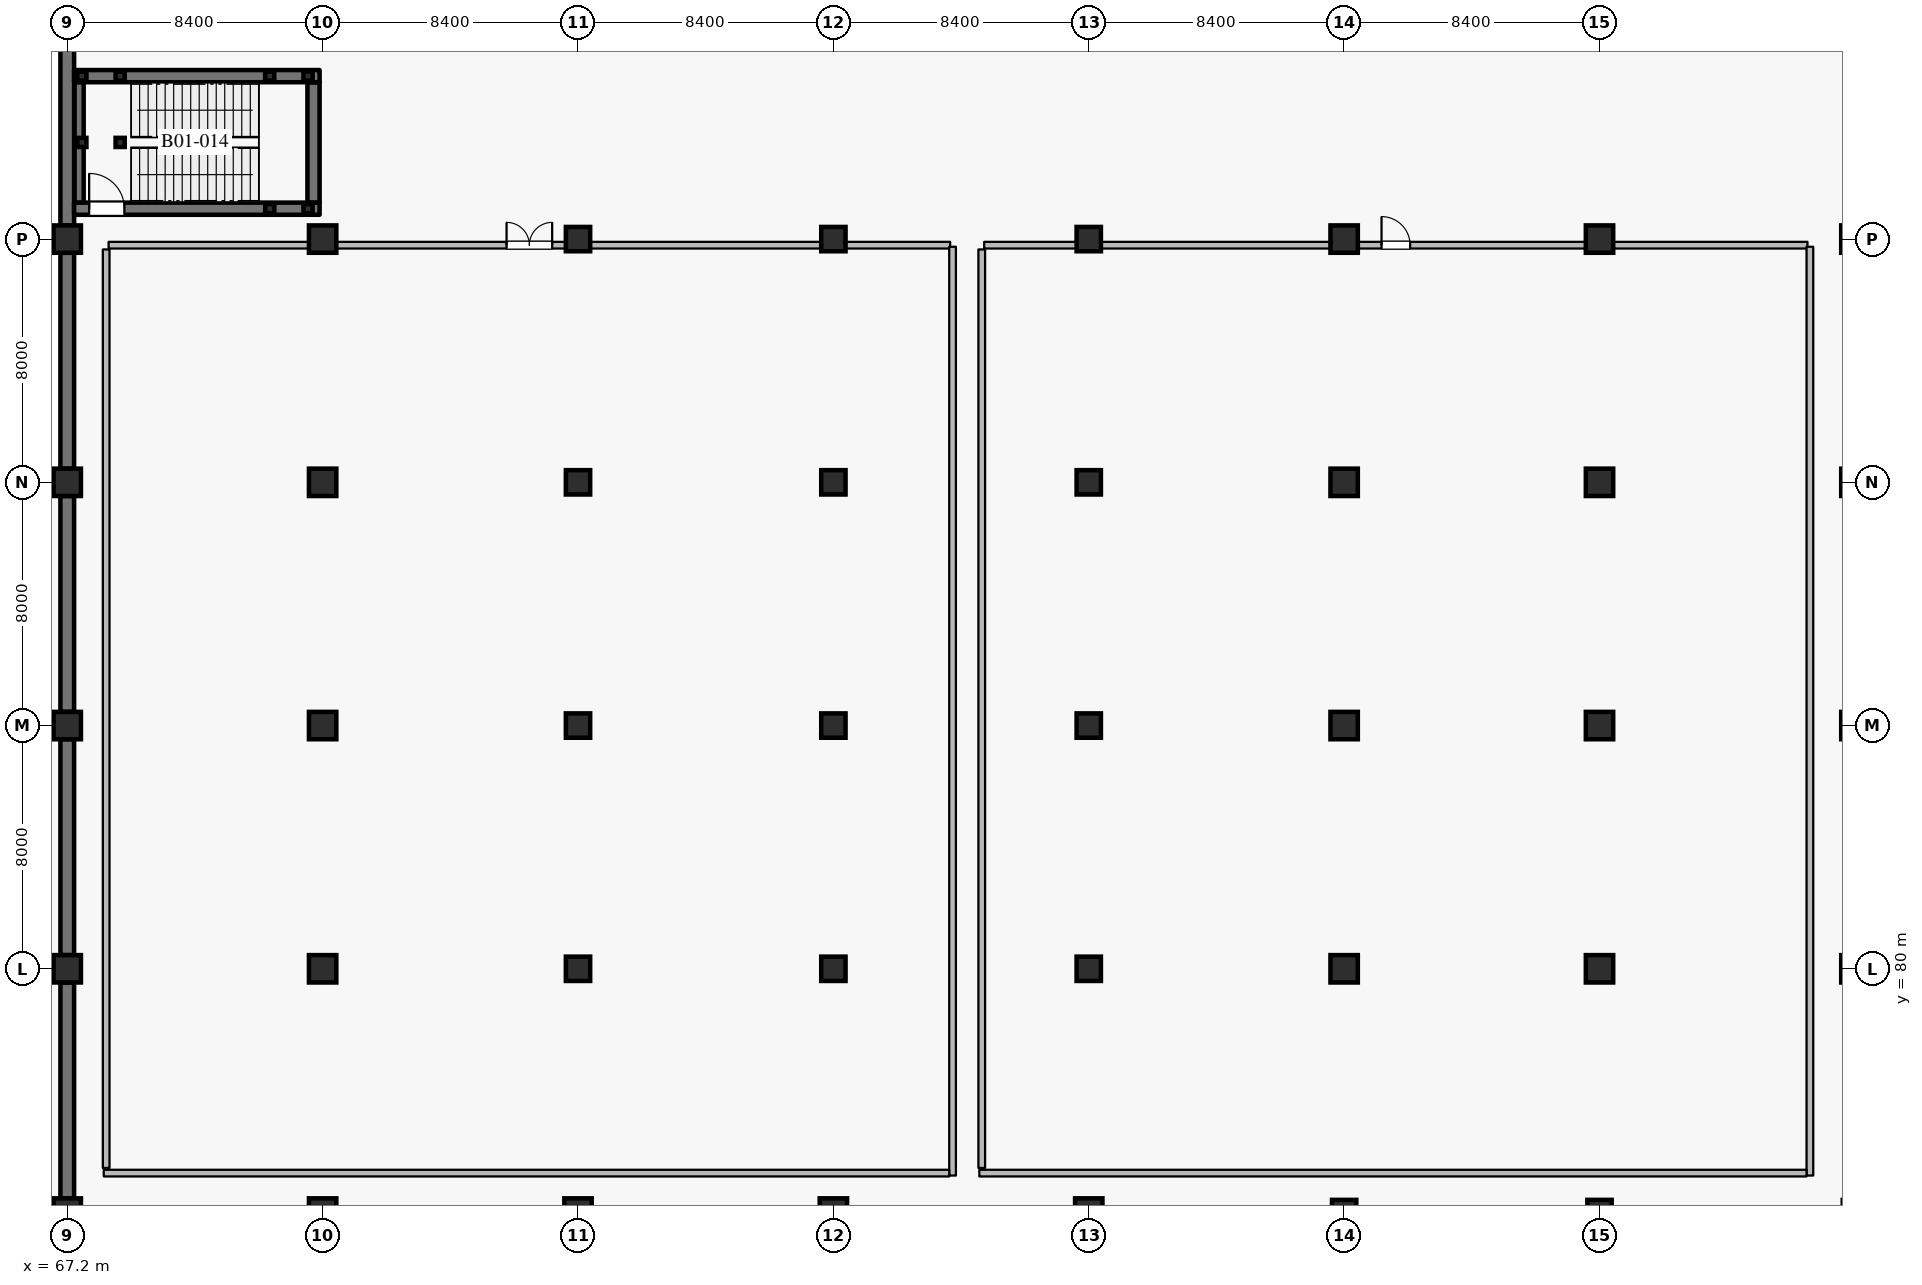
"""IFC4 building model, lengths in metres.
Left out: names, types, materials, properties, quantities, classifications, styles, units other than length and angle.
Written with IfcOpenShell. Run it as: python <this file> out.ifc"""

import sys

from ifc_helpers import new_model, si_unit, direction, frame, frame_2d, origin, origin_2d, place, context, subcontext, project, spatial, rectangle, hollow_rectangle, extrude, element, fill, save


model = new_model("IFC4")
c1 = context("Model", 3, precision=1e-05, world=origin(), true_north=direction((0.0, 1.0)))
c2 = subcontext(c1, "Body", "Model", "MODEL_VIEW")
j1 = project(units=[si_unit("LENGTHUNIT", "METRE"), si_unit("PLANEANGLEUNIT", "RADIAN")], contexts=[c1])
p1 = place(None, origin())
s1 = spatial("IfcSite", under=j1, at=p1, CompositionType="ELEMENT")
p2 = place(p1, origin())
s2 = spatial("IfcBuilding", under=s1, at=p2, CompositionType="ELEMENT")
p3 = place(p2, frame((0.0, 0.0, -5.4)))
s3 = spatial("IfcBuildingStorey", under=s2, at=p3, CompositionType="ELEMENT", Elevation=-5.4)
for number, where, z_axis, x_axis in (
    (1, (67.2, 72.0, 0.0), (0.0, 0.0, 1.0), (1.0, 0.0, 0.0)),
    (2, (67.2, 80.0, 0.0), (0.0, 0.0, 1.0), (1.0, 0.0, 0.0)),
    (3, (67.2, 88.0, 0.0), (0.0, 0.0, 1.0), (1.0, 0.0, 0.0)),
    (4, (67.2, 96.0, 0.0), (0.0, 0.0, 1.0), (1.0, 0.0, 0.0)),
    (5, (67.2, 104.0, 0.0), (0.0, 0.0, 1.0), (1.0, 0.0, 0.0)),
    (6, (75.6, 72.0, 0.0), (0.0, 0.0, 1.0), (1.0, 0.0, 0.0)),
    (7, (75.6, 80.0, 0.0), (0.0, 0.0, 1.0), (1.0, 0.0, 0.0)),
    (8, (75.6, 88.0, 0.0), (0.0, 0.0, 1.0), (1.0, 0.0, 0.0)),
    (9, (75.6, 96.0, 0.0), (0.0, 0.0, 1.0), (1.0, 0.0, 0.0)),
    (10, (75.6, 104.0, 0.0), (0.0, 0.0, 1.0), (1.0, 0.0, 0.0)),
    (11, (84.0, 72.0, 0.0), (0.0, 0.0, 1.0), (1.0, 0.0, 0.0)),
):
    element("IfcColumn", number, at=place(p3, frame(where, z_axis=z_axis, x_axis=x_axis)), inside=s3, PredefinedType="COLUMN", context=c2, shape_type="SweptSolid", body=[
        extrude(rectangle(XDim=0.9, YDim=0.9, at=origin_2d()), origin(), (0.0, 0.0, 1.0), 5.4),
    ])
for number, where, z_axis, x_axis in (
    (12, (84.0, 80.0, 0.0), (0.0, 0.0, 1.0), (1.0, 0.0, 0.0)),
    (13, (84.0, 88.0, 0.0), (0.0, 0.0, 1.0), (1.0, 0.0, 0.0)),
    (14, (84.0, 96.0, 0.0), (0.0, 0.0, 1.0), (1.0, 0.0, 0.0)),
    (15, (84.0, 104.0, 0.0), (0.0, 0.0, 1.0), (1.0, 0.0, 0.0)),
):
    element("IfcColumn", number, at=place(p3, frame(where, z_axis=z_axis, x_axis=x_axis)), inside=s3, PredefinedType="COLUMN", context=c2, shape_type="SweptSolid", body=[
        extrude(rectangle(XDim=0.8, YDim=0.8, at=origin_2d()), origin(), (0.0, 0.0, 1.0), 5.4),
    ])
p4 = place(p3, frame((92.4, 72.0, 0.0), z_axis=(0.0, 0.0, 1.0), x_axis=(1.0, 0.0, 0.0)))
e16 = element("IfcColumn", 16, at=p4, inside=s3, PredefinedType="COLUMN", context=c2, shape_type="SweptSolid", body=[
    extrude(rectangle(XDim=0.9, YDim=0.9, at=origin_2d()), origin(), (0.0, 0.0, 1.0), 5.4),
])
for number, where, z_axis, x_axis in (
    (17, (92.4, 80.0, 0.0), (0.0, 0.0, 1.0), (1.0, 0.0, 0.0)),
    (18, (92.4, 88.0, 0.0), (0.0, 0.0, 1.0), (1.0, 0.0, 0.0)),
    (19, (92.4, 96.0, 0.0), (0.0, 0.0, 1.0), (1.0, 0.0, 0.0)),
    (20, (92.4, 104.0, 0.0), (0.0, 0.0, 1.0), (1.0, 0.0, 0.0)),
):
    element("IfcColumn", number, at=place(p3, frame(where, z_axis=z_axis, x_axis=x_axis)), inside=s3, PredefinedType="COLUMN", context=c2, shape_type="SweptSolid", body=[
        extrude(rectangle(XDim=0.8, YDim=0.8, at=origin_2d()), origin(), (0.0, 0.0, 1.0), 5.4),
    ])
p5 = place(p3, frame((100.8, 72.0, 0.0), z_axis=(0.0, 0.0, 1.0), x_axis=(1.0, 0.0, 0.0)))
e21 = element("IfcColumn", 21, at=p5, inside=s3, PredefinedType="COLUMN", context=c2, shape_type="SweptSolid", body=[
    extrude(rectangle(XDim=0.9, YDim=0.9, at=origin_2d()), origin(), (0.0, 0.0, 1.0), 5.4),
])
for number, where, z_axis, x_axis in (
    (22, (100.8, 80.0, 0.0), (0.0, 0.0, 1.0), (1.0, 0.0, 0.0)),
    (23, (100.8, 88.0, 0.0), (0.0, 0.0, 1.0), (1.0, 0.0, 0.0)),
    (24, (100.8, 96.0, 0.0), (0.0, 0.0, 1.0), (1.0, 0.0, 0.0)),
    (25, (100.8, 104.0, 0.0), (0.0, 0.0, 1.0), (1.0, 0.0, 0.0)),
    (26, (109.2, 72.0, 0.0), (0.0, 0.0, 1.0), (1.0, 0.0, 0.0)),
):
    element("IfcColumn", number, at=place(p3, frame(where, z_axis=z_axis, x_axis=x_axis)), inside=s3, PredefinedType="COLUMN", context=c2, shape_type="SweptSolid", body=[
        extrude(rectangle(XDim=0.8, YDim=0.8, at=origin_2d()), origin(), (0.0, 0.0, 1.0), 5.4),
    ])
for number, where, z_axis, x_axis in (
    (27, (109.2, 80.0, 0.0), (0.0, 0.0, 1.0), (1.0, 0.0, 0.0)),
    (28, (109.2, 88.0, 0.0), (0.0, 0.0, 1.0), (1.0, 0.0, 0.0)),
    (29, (109.2, 96.0, 0.0), (0.0, 0.0, 1.0), (1.0, 0.0, 0.0)),
    (30, (109.2, 104.0, 0.0), (0.0, 0.0, 1.0), (1.0, 0.0, 0.0)),
):
    element("IfcColumn", number, at=place(p3, frame(where, z_axis=z_axis, x_axis=x_axis)), inside=s3, PredefinedType="COLUMN", context=c2, shape_type="SweptSolid", body=[
        extrude(rectangle(XDim=0.9, YDim=0.9, at=origin_2d()), origin(), (0.0, 0.0, 1.0), 5.4),
    ])
p6 = place(p3, frame((117.6, 72.0, 0.0), z_axis=(0.0, 0.0, 1.0), x_axis=(1.0, 0.0, 0.0)))
e31 = element("IfcColumn", 31, at=p6, inside=s3, PredefinedType="COLUMN", context=c2, shape_type="SweptSolid", body=[
    extrude(rectangle(XDim=0.8, YDim=0.8, at=origin_2d()), origin(), (0.0, 0.0, 1.0), 5.4),
])
for number, where, z_axis, x_axis in (
    (32, (117.6, 80.0, 0.0), (0.0, 0.0, 1.0), (1.0, 0.0, 0.0)),
    (33, (117.6, 88.0, 0.0), (0.0, 0.0, 1.0), (1.0, 0.0, 0.0)),
    (34, (117.6, 96.0, 0.0), (0.0, 0.0, 1.0), (1.0, 0.0, 0.0)),
    (35, (117.6, 104.0, 0.0), (0.0, 0.0, 1.0), (1.0, 0.0, 0.0)),
    (36, (126.0, 80.0, 0.0), (0.0, 0.0, 1.0), (1.0, 0.0, 0.0)),
    (37, (126.0, 88.0, 0.0), (0.0, 0.0, 1.0), (1.0, 0.0, 0.0)),
    (38, (126.0, 96.0, 0.0), (0.0, 0.0, 1.0), (1.0, 0.0, 0.0)),
    (39, (126.0, 104.0, 0.0), (0.0, 0.0, 1.0), (1.0, 0.0, 0.0)),
):
    element("IfcColumn", number, at=place(p3, frame(where, z_axis=z_axis, x_axis=x_axis)), inside=s3, PredefinedType="COLUMN", context=c2, shape_type="SweptSolid", body=[
        extrude(rectangle(XDim=0.9, YDim=0.9, at=origin_2d()), origin(), (0.0, 0.0, 1.0), 5.4),
    ])
for number, where, z_axis, x_axis in (
    (40, (67.2, 72.45, 0.0), (0.0, 0.0, 1.0), (0.0, 1.0, 0.0)),
    (41, (67.2, 80.45, 0.0), (0.0, 0.0, 1.0), (0.0, 1.0, 0.0)),
    (42, (67.2, 88.45, 0.0), (0.0, 0.0, 1.0), (0.0, 1.0, 0.0)),
    (43, (67.2, 96.45, 0.0), (0.0, 0.0, 1.0), (0.0, 1.0, 0.0)),
    (44, (67.2, 104.45, 0.0), (0.0, 0.0, 1.0), (0.0, 1.0, 0.0)),
):
    element("IfcWall", number, at=place(p3, frame(where, z_axis=z_axis, x_axis=x_axis)), inside=s3, PredefinedType="USERDEFINED", context=c2, shape_type="SweptSolid", body=[
        extrude(rectangle(XDim=7.1, YDim=0.45, at=frame_2d((3.55, 0.0))), origin(), (0.0, 0.0, 1.0), 4.3),
    ])
p7 = place(p3, frame((67.425, 105.0, 0.0), z_axis=(0.0, 0.0, 1.0), x_axis=(1.0, 0.0, 0.0)))
e45 = element("IfcWall", 45, at=p7, inside=s3, PredefinedType="SHEAR", context=c2, shape_type="SweptSolid", body=[
    extrude(rectangle(XDim=8.075, YDim=0.4, at=frame_2d((4.038, 0.0))), origin(), (0.0, 0.0, 1.0), 4.995),
])
p8 = place(p7, frame((0.495, 0.0, 0.0)))
e46 = element("IfcOpeningElement", 46, at=p8, cuts=e45, PredefinedType="OPENING", context=c2, shape_type="SweptSolid", body=[
    extrude(rectangle(XDim=1.16, YDim=2.2, at=frame_2d((0.58, 1.1))), frame((0.0, 0.21, 0.0), z_axis=(0.0, -1.0, 0.0), x_axis=(1.0, 0.0, 0.0)), (0.0, 0.0, 1.0), 0.42),
])
p9 = place(p3, frame((75.3, 105.205, 0.0), z_axis=(0.0, 0.0, 1.0), x_axis=(0.0, 1.0, 0.0)))
e47 = element("IfcWall", 47, at=p9, inside=s3, PredefinedType="SHEAR", context=c2, shape_type="SweptSolid", body=[
    extrude(rectangle(XDim=3.95, YDim=0.4, at=frame_2d((1.975, 0.0))), origin(), (0.0, 0.0, 1.0), 4.995),
])
p10 = place(p3, frame((67.425, 109.36, 0.0), z_axis=(0.0, 0.0, 1.0), x_axis=(1.0, 0.0, 0.0)))
e48 = element("IfcWall", 48, at=p10, inside=s3, PredefinedType="SHEAR", context=c2, shape_type="SweptSolid", body=[
    extrude(rectangle(XDim=8.075, YDim=0.4, at=frame_2d((4.038, 0.0))), origin(), (0.0, 0.0, 1.0), 4.995),
])
p11 = place(p3, frame((67.59, 105.205, 0.0), z_axis=(0.0, 0.0, 1.0), x_axis=(0.0, 1.0, 0.0)))
e49 = element("IfcWall", 49, at=p11, inside=s3, PredefinedType="SHEAR", context=c2, shape_type="SweptSolid", body=[
    extrude(rectangle(XDim=3.95, YDim=0.3, at=frame_2d((1.975, 0.0))), origin(), (0.0, 0.0, 1.0), 4.995),
])
for number, where, z_axis, x_axis in (
    (50, (67.68, 107.18, 0.0), (0.0, 0.0, 1.0), (1.0, 0.0, 0.0)),
    (51, (67.68, 109.36, 0.0), (0.0, 0.0, 1.0), (1.0, 0.0, 0.0)),
    (52, (68.94, 107.18, 0.0), (0.0, 0.0, 1.0), (1.0, 0.0, 0.0)),
    (53, (68.94, 109.36, 0.0), (0.0, 0.0, 1.0), (1.0, 0.0, 0.0)),
):
    element("IfcColumn", number, at=place(p3, frame(where, z_axis=z_axis, x_axis=x_axis)), inside=s3, PredefinedType="COLUMN", context=c2, shape_type="SweptSolid", body=[
        extrude(hollow_rectangle(XDim=0.3, YDim=0.3, WallThickness=0.012, at=origin_2d()), origin(), (0.0, 0.0, 1.0), 5.22),
    ])
for number, where, z_axis, x_axis in (
    (54, (73.86, 105.0, 0.0), (0.0, 0.0, 1.0), (1.0, 0.0, 0.0)),
    (55, (73.86, 109.36, 0.0), (0.0, 0.0, 1.0), (1.0, 0.0, 0.0)),
    (56, (75.12, 105.0, 0.0), (0.0, 0.0, 1.0), (1.0, 0.0, 0.0)),
    (57, (75.12, 109.36, 0.0), (0.0, 0.0, 1.0), (1.0, 0.0, 0.0)),
):
    element("IfcColumn", number, at=place(p3, frame(where, z_axis=z_axis, x_axis=x_axis)), inside=s3, PredefinedType="COLUMN", context=c2, shape_type="SweptSolid", body=[
        extrude(hollow_rectangle(XDim=0.3, YDim=0.3, WallThickness=0.012, at=origin_2d()), origin(), (0.0, 0.0, 1.0), 2.52),
    ])
p12 = place(p3, frame((68.56, 103.8, 0.0), z_axis=(0.0, 0.0, 1.0), x_axis=(1.0, 0.0, 0.0)))
e58 = element("IfcWall", 58, at=p12, inside=s3, PredefinedType="PARTITIONING", context=c2, shape_type="SweptSolid", body=[
    extrude(rectangle(XDim=27.68, YDim=0.22, at=frame_2d((13.84, 0.0))), origin(), (0.0, 0.0, 1.0), 4.15),
])
p13 = place(p12, frame((13.09, 0.0, 0.0)))
e59 = element("IfcOpeningElement", 59, at=p13, cuts=e58, PredefinedType="OPENING", context=c2, shape_type="SweptSolid", body=[
    extrude(rectangle(XDim=1.5, YDim=2.3, at=frame_2d((0.75, 1.15))), frame((0.0, 0.12, 0.0), z_axis=(0.0, -1.0, 0.0), x_axis=(1.0, 0.0, 0.0)), (0.0, 0.0, 1.0), 0.24),
])
p14 = place(p3, frame((68.48, 73.45, 0.0), z_axis=(0.0, 0.0, 1.0), x_axis=(0.0, 1.0, 0.0)))
e60 = element("IfcWall", 60, at=p14, inside=s3, PredefinedType="PARTITIONING", context=c2, shape_type="SweptSolid", body=[
    extrude(rectangle(XDim=30.21, YDim=0.22, at=frame_2d((15.105, 0.0))), origin(), (0.0, 0.0, 1.0), 4.995),
])
p15 = place(p3, frame((97.36, 103.8, 0.0), z_axis=(0.0, 0.0, 1.0), x_axis=(1.0, 0.0, 0.0)))
e61 = element("IfcWall", 61, at=p15, inside=s3, PredefinedType="PARTITIONING", context=c2, shape_type="SweptSolid", body=[
    extrude(rectangle(XDim=27.08, YDim=0.22, at=frame_2d((13.54, 0.0))), origin(), (0.0, 0.0, 1.0), 4.15),
])
p16 = place(p15, frame((13.07, 0.0, 0.0)))
e62 = element("IfcOpeningElement", 62, at=p16, cuts=e61, PredefinedType="OPENING", context=c2, shape_type="SweptSolid", body=[
    extrude(rectangle(XDim=0.94, YDim=2.15, at=frame_2d((0.47, 1.075))), frame((0.0, 0.12, 0.0), z_axis=(0.0, -1.0, 0.0), x_axis=(1.0, 0.0, 0.0)), (0.0, 0.0, 1.0), 0.24),
])
p17 = place(p3, frame((97.28, 73.45, 0.0), z_axis=(0.0, 0.0, 1.0), x_axis=(0.0, 1.0, 0.0)))
e63 = element("IfcWall", 63, at=p17, inside=s3, PredefinedType="PARTITIONING", context=c2, shape_type="SweptSolid", body=[
    extrude(rectangle(XDim=30.21, YDim=0.22, at=frame_2d((15.105, 0.0))), origin(), (0.0, 0.0, 1.0), 4.995),
])
p18 = place(p3, frame((96.32, 73.2, 0.0), z_axis=(0.0, 0.0, 1.0), x_axis=(0.0, 1.0, 0.0)))
e64 = element("IfcWall", 64, at=p18, inside=s3, PredefinedType="PARTITIONING", context=c2, shape_type="SweptSolid", body=[
    extrude(rectangle(XDim=30.548, YDim=0.22, at=frame_2d((15.274, 0.0))), origin(), (0.0, 0.0, 1.0), 4.995),
])
p19 = place(p3, frame((68.4, 73.28, 0.0), z_axis=(0.0, 0.0, 1.0), x_axis=(1.0, 0.0, 0.0)))
e65 = element("IfcWall", 65, at=p19, inside=s3, PredefinedType="PARTITIONING", context=c2, shape_type="SweptSolid", body=[
    extrude(rectangle(XDim=27.81, YDim=0.22, at=frame_2d((13.905, 0.0))), origin(), (0.0, 0.0, 1.0), 4.995),
])
p20 = place(p3, frame((124.52, 73.2, 0.0), z_axis=(0.0, 0.0, 1.0), x_axis=(0.0, 1.0, 0.0)))
e66 = element("IfcWall", 66, at=p20, inside=s3, PredefinedType="PARTITIONING", context=c2, shape_type="SweptSolid", body=[
    extrude(rectangle(XDim=30.548, YDim=0.22, at=frame_2d((15.274, 0.0))), origin(), (0.0, 0.0, 1.0), 4.995),
])
p21 = place(p3, frame((97.2, 73.28, 0.0), z_axis=(0.0, 0.0, 1.0), x_axis=(1.0, 0.0, 0.0)))
e67 = element("IfcWall", 67, at=p21, inside=s3, PredefinedType="PARTITIONING", context=c2, shape_type="SweptSolid", body=[
    extrude(rectangle(XDim=27.21, YDim=0.22, at=frame_2d((13.605, 0.0))), origin(), (0.0, 0.0, 1.0), 4.995),
])
p22 = place(p8, origin())
e68 = element("IfcDoor", 68, at=p22, inside=s3, OperationType="SINGLE_SWING_LEFT", PredefinedType="DOOR", context=c2, shape_type="SweptSolid", body=[
    extrude(rectangle(XDim=1.16, YDim=2.2, at=frame_2d((0.58, 1.1))), frame((0.0, 0.025, 0.0), z_axis=(0.0, -1.0, 0.0), x_axis=(1.0, 0.0, 0.0)), (0.0, 0.0, 1.0), 0.05),
])
fill(e46, e68)
p23 = place(p13, origin())
e69 = element("IfcDoor", 69, at=p23, inside=s3, OperationType="DOUBLE_DOOR_SINGLE_SWING", PredefinedType="DOOR", context=c2, shape_type="SweptSolid", body=[
    extrude(rectangle(XDim=1.5, YDim=2.3, at=frame_2d((0.75, 1.15))), frame((0.0, 0.025, 0.0), z_axis=(0.0, -1.0, 0.0), x_axis=(1.0, 0.0, 0.0)), (0.0, 0.0, 1.0), 0.05),
])
fill(e59, e69)
p24 = place(p16, origin())
e70 = element("IfcDoor", 70, at=p24, inside=s3, OperationType="SINGLE_SWING_LEFT", PredefinedType="DOOR", context=c2, shape_type="SweptSolid", body=[
    extrude(rectangle(XDim=0.94, YDim=2.15, at=frame_2d((0.47, 1.075))), frame((0.0, 0.025, 0.0), z_axis=(0.0, -1.0, 0.0), x_axis=(1.0, 0.0, 0.0)), (0.0, 0.0, 1.0), 0.05),
])
fill(e62, e70)
save(model, sys.argv[1])
